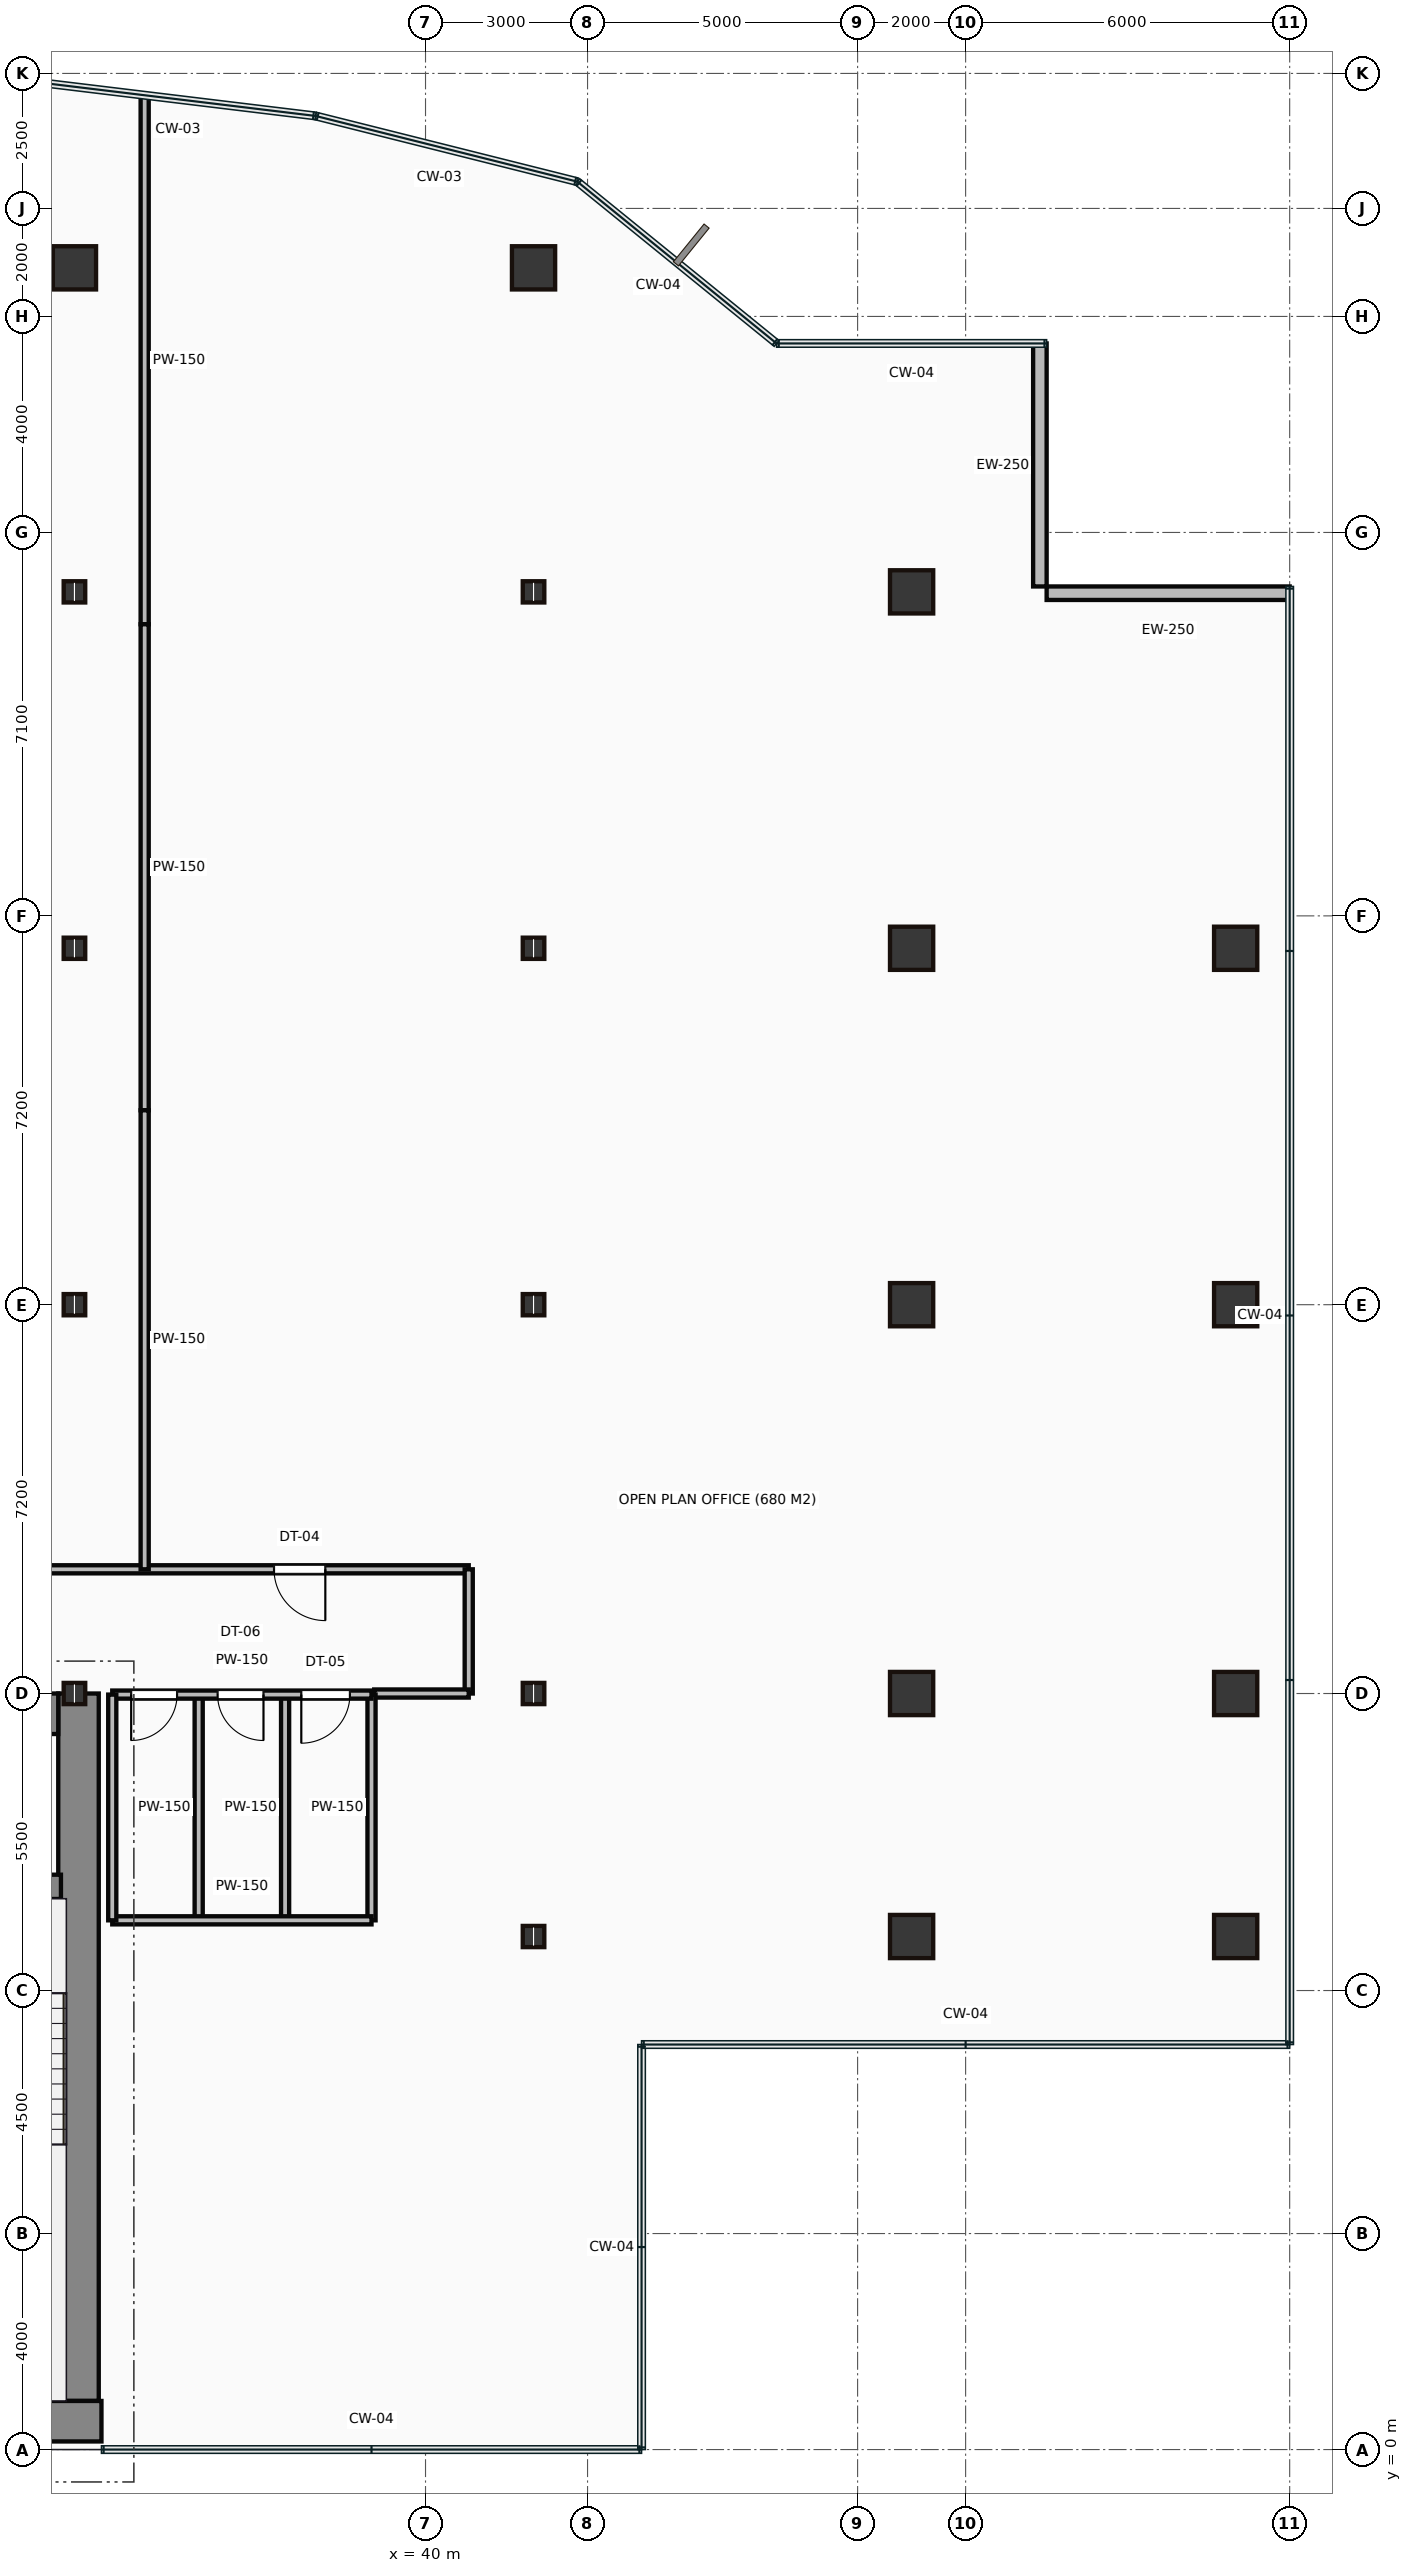
"""IFC4 building model, lengths in metres.
Left out: names, types, materials, properties, quantities, classifications, styles, units other than length and angle.
Written with IfcOpenShell. Run it as: python <this file> out.ifc"""

import sys

from ifc_helpers import new_model, si_unit, direction, frame, frame_2d, origin, origin_2d, place, context, subcontext, project, spatial, rectangle, hollow_rectangle, i_section, extrude, source, transform, mapped, element, fill, save


model = new_model("IFC4")
c1 = context("Model", 3, precision=1e-05, world=origin(), true_north=direction((0.0, 1.0)))
c2 = subcontext(c1, "Body", "Model", "MODEL_VIEW")
j1 = project(units=[si_unit("LENGTHUNIT", "METRE"), si_unit("PLANEANGLEUNIT", "RADIAN")], contexts=[c1])
p1 = place(None, origin())
s1 = spatial("IfcSite", under=j1, at=p1, CompositionType="ELEMENT")
p2 = place(p1, origin())
s2 = spatial("IfcBuilding", under=s1, at=p2, CompositionType="ELEMENT")
p3 = place(p2, frame((0.0, 0.0, 106.9)))
s3 = spatial("IfcBuildingStorey", under=s2, at=p3, CompositionType="ELEMENT", Elevation=106.9)
m1 = source(origin(), c2, "Body", "SweptSolid", [
    extrude(rectangle(XDim=29.5, YDim=0.75, at=frame_2d((14.75, 0.0))), origin(), (0.0, 0.0, 1.0), 3.65),
])
p4 = place(p3, frame((4.5, 0.525, 0.0), z_axis=(0.0, 0.0, 1.0), x_axis=(1.0, 0.0, 0.0)))
e1 = element("IfcWall", 1, at=p4, inside=s3, PredefinedType="SHEAR", context=c2, shape_type="MappedRepresentation", body=[
    mapped(m1, transform((0.0, 0.0, 0.0))),
])
m2 = source(origin(), c2, "Body", "SweptSolid", [
    extrude(rectangle(XDim=13.1, YDim=0.75, at=frame_2d((6.55, 0.0))), origin(), (0.0, 0.0, 1.0), 3.65),
])
p5 = place(p3, frame((33.575, 0.9, 0.0), z_axis=(0.0, 0.0, 1.0), x_axis=(0.0, 1.0, 0.0)))
e2 = element("IfcWall", 2, at=p5, inside=s3, PredefinedType="SHEAR", context=c2, shape_type="MappedRepresentation", body=[
    mapped(m2, transform((0.0, 0.0, 0.0))),
])
m3 = source(origin(), c2, "Body", "SweptSolid", [
    extrude(rectangle(XDim=12.6, YDim=0.75, at=frame_2d((6.3, 0.0))), origin(), (0.0, 0.0, 1.0), 3.65),
])
p6 = place(p3, frame((20.6, 13.625, 0.0), z_axis=(0.0, 0.0, 1.0), x_axis=(1.0, 0.0, 0.0)))
e3 = element("IfcWall", 3, at=p6, inside=s3, PredefinedType="SHEAR", context=c2, shape_type="MappedRepresentation", body=[
    mapped(m3, transform((0.0, 0.0, 0.0))),
])
p7 = place(p6, frame((9.25, 0.0, 0.0)))
e4 = element("IfcOpeningElement", 4, at=p7, cuts=e3, PredefinedType="OPENING", context=c2, shape_type="SweptSolid", body=[
    extrude(rectangle(XDim=1.1, YDim=2.15, at=frame_2d((0.55, 1.075))), frame((0.0, 0.385, 0.0), z_axis=(0.0, -1.0, 0.0), x_axis=(1.0, 0.0, 0.0)), (0.0, 0.0, 1.0), 0.77),
])
m4 = source(origin(), c2, "Body", "SweptSolid", [
    extrude(rectangle(XDim=3.39, YDim=0.45, at=frame_2d((1.695, 0.0))), origin(), (0.0, 0.0, 1.0), 3.65),
])
p8 = place(p3, frame((29.86, 10.42, 0.0), z_axis=(0.0, 0.0, 1.0), x_axis=(1.0, 0.0, 0.0)))
e5 = element("IfcWall", 5, at=p8, inside=s3, PredefinedType="SHEAR", context=c2, shape_type="MappedRepresentation", body=[
    mapped(m4, transform((0.0, 0.0, 0.0))),
])
p9 = place(p8, frame((1.1, 0.0, 0.0)))
e6 = element("IfcOpeningElement", 6, at=p9, cuts=e5, PredefinedType="OPENING", context=c2, shape_type="SweptSolid", body=[
    extrude(rectangle(XDim=1.1, YDim=2.15, at=frame_2d((0.55, 1.075))), frame((0.0, 0.235, 0.0), z_axis=(0.0, -1.0, 0.0), x_axis=(1.0, 0.0, 0.0)), (0.0, 0.0, 1.0), 0.47),
])
m5 = source(origin(), c2, "Body", "SweptSolid", [
    extrude(i_section(OverallWidth=0.399, OverallDepth=0.393, WebThickness=0.023, FlangeThickness=0.037, at=origin_2d()), origin(), (0.0, 0.0, 1.0), 3.65),
])
for number, where, z_axis, x_axis in (
    (7, (33.5, 14.0, 0.0), (0.0, 0.0, 1.0), (1.0, 0.0, 0.0)),
    (8, (33.5, 21.2, 0.0), (0.0, 0.0, 1.0), (1.0, 0.0, 0.0)),
    (9, (33.5, 27.8, 0.0), (0.0, 0.0, 1.0), (1.0, 0.0, 0.0)),
    (10, (33.5, 34.4, 0.0), (0.0, 0.0, 1.0), (1.0, 0.0, 0.0)),
):
    element("IfcColumn", number, at=place(p3, frame(where, z_axis=z_axis, x_axis=x_axis)), inside=s3, PredefinedType="COLUMN", context=c2, shape_type="MappedRepresentation", body=[
        mapped(m5, transform((0.0, 0.0, 0.0))),
    ])
m6 = source(origin(), c2, "Body", "SweptSolid", [
    extrude(hollow_rectangle(XDim=0.8, YDim=0.8, WallThickness=0.04, at=origin_2d()), origin(), (0.0, 0.0, 1.0), 3.65),
])
p10 = place(p3, frame((33.5, 40.4, 0.0), z_axis=(0.0, 0.0, 1.0), x_axis=(1.0, 0.0, 0.0)))
e11 = element("IfcColumn", 11, at=p10, inside=s3, PredefinedType="COLUMN", context=c2, shape_type="MappedRepresentation", body=[
    mapped(m6, transform((0.0, 0.0, 0.0))),
])
for number, where, z_axis, x_axis in (
    (12, (42.0, 9.5, 0.0), (0.0, 0.0, 1.0), (1.0, 0.0, 0.0)),
    (13, (42.0, 14.0, 0.0), (0.0, 0.0, 1.0), (1.0, 0.0, 0.0)),
    (14, (42.0, 21.2, 0.0), (0.0, 0.0, 1.0), (1.0, 0.0, 0.0)),
    (15, (42.0, 27.8, 0.0), (0.0, 0.0, 1.0), (1.0, 0.0, 0.0)),
    (16, (42.0, 34.4, 0.0), (0.0, 0.0, 1.0), (1.0, 0.0, 0.0)),
):
    element("IfcColumn", number, at=place(p3, frame(where, z_axis=z_axis, x_axis=x_axis)), inside=s3, PredefinedType="COLUMN", context=c2, shape_type="MappedRepresentation", body=[
        mapped(m5, transform((0.0, 0.0, 0.0))),
    ])
for number, where, z_axis, x_axis in (
    (17, (42.0, 40.4, 0.0), (0.0, 0.0, 1.0), (1.0, 0.0, 0.0)),
    (18, (49.0, 9.5, 0.0), (0.0, 0.0, 1.0), (1.0, 0.0, 0.0)),
    (19, (49.0, 14.0, 0.0), (0.0, 0.0, 1.0), (1.0, 0.0, 0.0)),
    (20, (49.0, 21.2, 0.0), (0.0, 0.0, 1.0), (1.0, 0.0, 0.0)),
    (21, (49.0, 27.8, 0.0), (0.0, 0.0, 1.0), (1.0, 0.0, 0.0)),
    (22, (49.0, 34.4, 0.0), (0.0, 0.0, 1.0), (1.0, 0.0, 0.0)),
    (23, (55.0, 9.5, 0.0), (0.0, 0.0, 1.0), (1.0, 0.0, 0.0)),
    (24, (55.0, 14.0, 0.0), (0.0, 0.0, 1.0), (1.0, 0.0, 0.0)),
    (25, (55.0, 21.2, 0.0), (0.0, 0.0, 1.0), (1.0, 0.0, 0.0)),
    (26, (55.0, 27.8, 0.0), (0.0, 0.0, 1.0), (1.0, 0.0, 0.0)),
):
    element("IfcColumn", number, at=place(p3, frame(where, z_axis=z_axis, x_axis=x_axis)), inside=s3, PredefinedType="COLUMN", context=c2, shape_type="MappedRepresentation", body=[
        mapped(m6, transform((0.0, 0.0, 0.0))),
    ])
m7 = source(origin(), c2, "Body", "SweptSolid", [
    extrude(rectangle(XDim=4.5, YDim=0.25, at=frame_2d((2.25, 0.0))), origin(), (0.0, 0.0, 1.0), 3.4),
])
for number, where, z_axis, x_axis in (
    (27, (56.0, 34.375, 0.0), (0.0, 0.0, 1.0), (-1.0, 0.0, 0.0)),
    (28, (51.375, 34.5, 0.0), (0.0, 0.0, 1.0), (0.0, 1.0, 0.0)),
):
    element("IfcWall", number, at=place(p3, frame(where, z_axis=z_axis, x_axis=x_axis)), inside=s3, PredefinedType="STANDARD", context=c2, shape_type="MappedRepresentation", body=[
        mapped(m7, transform((0.0, 0.0, 0.0))),
    ])
m8 = source(origin(), c2, "Body", "SweptSolid", [
    extrude(rectangle(XDim=4.8, YDim=0.15, at=frame_2d((2.4, 0.0))), origin(), (0.0, 0.0, 1.0), 2.702),
])
p11 = place(p3, frame((34.2, 13.98, 0.0), z_axis=(0.0, 0.0, 1.0), x_axis=(1.0, 0.0, 0.0)))
e29 = element("IfcWall", 29, at=p11, inside=s3, PredefinedType="PARTITIONING", context=c2, shape_type="MappedRepresentation", body=[
    mapped(m8, transform((0.0, 0.0, 0.0))),
])
p12 = place(p11, frame((0.35, 0.0, 0.0)))
e30 = element("IfcOpeningElement", 30, at=p12, cuts=e29, PredefinedType="OPENING", context=c2, shape_type="SweptSolid", body=[
    extrude(rectangle(XDim=0.85, YDim=2.1, at=frame_2d((0.425, 1.05))), frame((0.0, 0.085, 0.0), z_axis=(0.0, -1.0, 0.0), x_axis=(1.0, 0.0, 0.0)), (0.0, 0.0, 1.0), 0.17),
])
p13 = place(p11, frame((1.95, 0.0, 0.0)))
e31 = element("IfcOpeningElement", 31, at=p13, cuts=e29, PredefinedType="OPENING", context=c2, shape_type="SweptSolid", body=[
    extrude(rectangle(XDim=0.85, YDim=2.1, at=frame_2d((0.425, 1.05))), frame((0.0, 0.085, 0.0), z_axis=(0.0, -1.0, 0.0), x_axis=(1.0, 0.0, 0.0)), (0.0, 0.0, 1.0), 0.17),
])
p14 = place(p11, frame((3.5, 0.0, 0.0)))
e32 = element("IfcOpeningElement", 32, at=p14, cuts=e29, PredefinedType="OPENING", context=c2, shape_type="SweptSolid", body=[
    extrude(rectangle(XDim=0.9, YDim=2.1, at=frame_2d((0.45, 1.05))), frame((0.0, 0.085, 0.0), z_axis=(0.0, -1.0, 0.0), x_axis=(1.0, 0.0, 0.0)), (0.0, 0.0, 1.0), 0.17),
])
m9 = source(origin(), c2, "Body", "SweptSolid", [
    extrude(rectangle(XDim=4.8, YDim=0.15, at=frame_2d((2.4, 0.0))), origin(), (0.0, 0.0, 1.0), 3.4),
])
p15 = place(p3, frame((34.2, 9.8, 0.0), z_axis=(0.0, 0.0, 1.0), x_axis=(1.0, 0.0, 0.0)))
e33 = element("IfcWall", 33, at=p15, inside=s3, PredefinedType="PARTITIONING", context=c2, shape_type="MappedRepresentation", body=[
    mapped(m9, transform((0.0, 0.0, 0.0))),
])
m10 = source(origin(), c2, "Body", "SweptSolid", [
    extrude(rectangle(XDim=4.18, YDim=0.15, at=frame_2d((2.09, 0.0))), origin(), (0.0, 0.0, 1.0), 3.4),
])
for number, where, z_axis, x_axis in (
    (34, (39.0, 9.8, 0.0), (0.0, 0.0, 1.0), (0.0, 1.0, 0.0)),
    (35, (34.2, 9.8, 0.0), (0.0, 0.0, 1.0), (0.0, 1.0, 0.0)),
    (36, (35.8, 9.8, 0.0), (0.0, 0.0, 1.0), (0.0, 1.0, 0.0)),
    (37, (37.4, 9.8, 0.0), (0.0, 0.0, 1.0), (0.0, 1.0, 0.0)),
):
    element("IfcWall", number, at=place(p3, frame(where, z_axis=z_axis, x_axis=x_axis)), inside=s3, PredefinedType="PARTITIONING", context=c2, shape_type="MappedRepresentation", body=[
        mapped(m10, transform((0.0, 0.0, 0.0))),
    ])
m11 = source(origin(), c2, "Body", "SweptSolid", [
    extrude(rectangle(XDim=28.75, YDim=0.15, at=frame_2d((14.375, 0.0))), origin(), (0.0, 0.0, 1.0), 3.4),
])
p16 = place(p3, frame((12.05, 16.3, 0.0), z_axis=(0.0, 0.0, 1.0), x_axis=(1.0, 0.0, 0.0)))
e38 = element("IfcWall", 38, at=p16, inside=s3, PredefinedType="PARTITIONING", context=c2, shape_type="MappedRepresentation", body=[
    mapped(m11, transform((0.0, 0.0, 0.0))),
])
p17 = place(p16, frame((5.43, 0.0, 0.0)))
e39 = element("IfcOpeningElement", 39, at=p17, cuts=e38, PredefinedType="OPENING", context=c2, shape_type="SweptSolid", body=[
    extrude(rectangle(XDim=0.95, YDim=2.15, at=frame_2d((0.475, 1.075))), frame((0.0, 0.085, 0.0), z_axis=(0.0, -1.0, 0.0), x_axis=(1.0, 0.0, 0.0)), (0.0, 0.0, 1.0), 0.17),
])
p18 = place(p16, frame((16.675, 0.0, 0.0)))
e40 = element("IfcOpeningElement", 40, at=p18, cuts=e38, PredefinedType="OPENING", context=c2, shape_type="SweptSolid", body=[
    extrude(rectangle(XDim=0.95, YDim=2.15, at=frame_2d((0.475, 1.075))), frame((0.0, 0.085, 0.0), z_axis=(0.0, -1.0, 0.0), x_axis=(1.0, 0.0, 0.0)), (0.0, 0.0, 1.0), 0.17),
])
p19 = place(p16, frame((25.145, 0.0, 0.0)))
e41 = element("IfcOpeningElement", 41, at=p19, cuts=e38, PredefinedType="OPENING", context=c2, shape_type="SweptSolid", body=[
    extrude(rectangle(XDim=0.95, YDim=2.15, at=frame_2d((0.475, 1.075))), frame((0.0, 0.085, 0.0), z_axis=(0.0, -1.0, 0.0), x_axis=(1.0, 0.0, 0.0)), (0.0, 0.0, 1.0), 0.17),
])
m12 = source(origin(), c2, "Body", "SweptSolid", [
    extrude(rectangle(XDim=2.3, YDim=0.15, at=frame_2d((1.15, 0.0))), origin(), (0.0, 0.0, 1.0), 3.4),
])
p20 = place(p3, frame((40.8, 16.3, 0.0), z_axis=(0.0, 0.0, 1.0), x_axis=(0.0, -1.0, 0.0)))
e42 = element("IfcWall", 42, at=p20, inside=s3, PredefinedType="PARTITIONING", context=c2, shape_type="MappedRepresentation", body=[
    mapped(m12, transform((0.0, 0.0, 0.0))),
])
m13 = source(origin(), c2, "Body", "SweptSolid", [
    extrude(rectangle(XDim=1.75, YDim=0.15, at=frame_2d((0.875, 0.0))), origin(), (0.0, 0.0, 1.0), 2.702),
])
p21 = place(p3, frame((40.8, 14.0, 0.0), z_axis=(0.0, 0.0, 1.0), x_axis=(-1.0, 0.0, 0.0)))
e43 = element("IfcWall", 43, at=p21, inside=s3, PredefinedType="PARTITIONING", context=c2, shape_type="MappedRepresentation", body=[
    mapped(m13, transform((0.0, 0.0, 0.0))),
])
m14 = source(origin(), c2, "Body", "SweptSolid", [
    extrude(rectangle(XDim=9.776, YDim=0.15, at=frame_2d((4.888, 0.0))), origin(), (0.0, 0.0, 1.0), 3.4),
])
p22 = place(p3, frame((34.8, 43.576, 0.0), z_axis=(0.0, 0.0, 1.0), x_axis=(0.0, -1.0, 0.0)))
e44 = element("IfcWall", 44, at=p22, inside=s3, PredefinedType="PARTITIONING", context=c2, shape_type="MappedRepresentation", body=[
    mapped(m14, transform((0.0, 0.0, 0.0))),
])
m15 = source(origin(), c2, "Body", "SweptSolid", [
    extrude(rectangle(XDim=9.0, YDim=0.15, at=frame_2d((4.5, 0.0))), origin(), (0.0, 0.0, 1.0), 3.4),
])
p23 = place(p3, frame((34.8, 33.8, 0.0), z_axis=(0.0, 0.0, 1.0), x_axis=(0.0, -1.0, 0.0)))
e45 = element("IfcWall", 45, at=p23, inside=s3, PredefinedType="PARTITIONING", context=c2, shape_type="MappedRepresentation", body=[
    mapped(m15, transform((0.0, 0.0, 0.0))),
])
m16 = source(origin(), c2, "Body", "SweptSolid", [
    extrude(rectangle(XDim=8.5, YDim=0.15, at=frame_2d((4.25, 0.0))), origin(), (0.0, 0.0, 1.0), 3.4),
])
p24 = place(p3, frame((34.8, 24.8, 0.0), z_axis=(0.0, 0.0, 1.0), x_axis=(0.0, -1.0, 0.0)))
e46 = element("IfcWall", 46, at=p24, inside=s3, PredefinedType="PARTITIONING", context=c2, shape_type="MappedRepresentation", body=[
    mapped(m16, transform((0.0, 0.0, 0.0))),
])
m17 = source(origin(), c2, "Body", "SweptSolid", [
    extrude(rectangle(XDim=0.85, YDim=2.1, at=frame_2d((0.425, 1.05))), frame((0.0, 0.025, 0.0), z_axis=(0.0, -1.0, 0.0), x_axis=(1.0, 0.0, 0.0)), (0.0, 0.0, 1.0), 0.05),
])
p25 = place(p12, frame((0.85, 0.0, 0.0), z_axis=(0.0, 0.0, 1.0), x_axis=(-1.0, 0.0, 0.0)))
e47 = element("IfcDoor", 47, at=p25, inside=s3, OperationType="SINGLE_SWING_LEFT", PredefinedType="DOOR", context=c2, shape_type="MappedRepresentation", body=[
    mapped(m17, transform((0.0, 0.0, 0.0))),
])
fill(e30, e47)
p26 = place(p13, frame((0.85, 0.0, 0.0), z_axis=(0.0, 0.0, 1.0), x_axis=(-1.0, 0.0, 0.0)))
e48 = element("IfcDoor", 48, at=p26, inside=s3, OperationType="SINGLE_SWING_RIGHT", PredefinedType="DOOR", context=c2, shape_type="MappedRepresentation", body=[
    mapped(m17, transform((0.0, 0.0, 0.0))),
])
fill(e31, e48)
m18 = source(origin(), c2, "Body", "SweptSolid", [
    extrude(rectangle(XDim=0.9, YDim=2.1, at=frame_2d((0.45, 1.05))), frame((0.0, 0.025, 0.0), z_axis=(0.0, -1.0, 0.0), x_axis=(1.0, 0.0, 0.0)), (0.0, 0.0, 1.0), 0.05),
])
p27 = place(p14, frame((0.9, 0.0, 0.0), z_axis=(0.0, 0.0, 1.0), x_axis=(-1.0, 0.0, 0.0)))
e49 = element("IfcDoor", 49, at=p27, inside=s3, OperationType="SINGLE_SWING_LEFT", PredefinedType="DOOR", context=c2, shape_type="MappedRepresentation", body=[
    mapped(m18, transform((0.0, 0.0, 0.0))),
])
fill(e32, e49)
m19 = source(origin(), c2, "Body", "SweptSolid", [
    extrude(rectangle(XDim=0.95, YDim=2.15, at=frame_2d((0.475, 1.075))), frame((0.0, 0.025, 0.0), z_axis=(0.0, -1.0, 0.0), x_axis=(1.0, 0.0, 0.0)), (0.0, 0.0, 1.0), 0.05),
])
p28 = place(p19, origin())
e50 = element("IfcDoor", 50, at=p28, inside=s3, OperationType="SINGLE_SWING_RIGHT", PredefinedType="DOOR", context=c2, shape_type="MappedRepresentation", body=[
    mapped(m19, transform((0.0, 0.0, 0.0))),
])
fill(e41, e50)
save(model, sys.argv[1])
